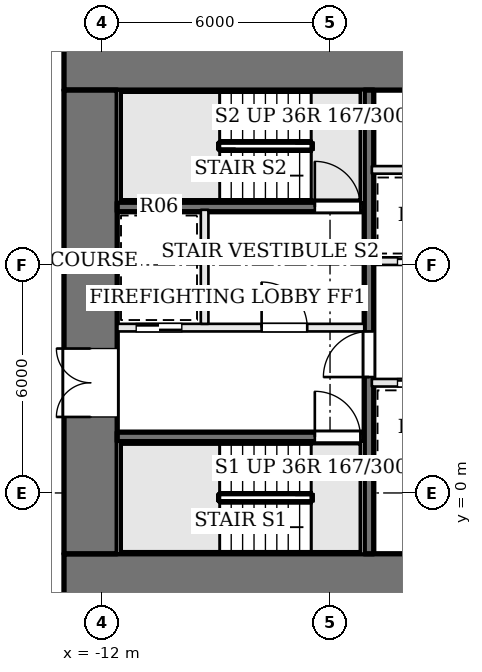
"""IFC4 building model, lengths in metres.
Left out: names, types, materials, properties, quantities, classifications, styles, units other than length and angle.
Written with IfcOpenShell. Run it as: python <this file> out.ifc"""

import sys

from ifc_helpers import new_model, si_unit, direction, frame, frame_2d, origin, place, context, subcontext, project, spatial, rectangle, extrude, element, fill, save


model = new_model("IFC4")
c1 = context("Model", 3, precision=1e-05, world=origin(), true_north=direction((0.0, 1.0)))
c2 = subcontext(c1, "Body", "Model", "MODEL_VIEW")
j1 = project(units=[si_unit("LENGTHUNIT", "METRE"), si_unit("PLANEANGLEUNIT", "RADIAN")], contexts=[c1])
p1 = place(None, origin())
s1 = spatial("IfcSite", under=j1, at=p1, CompositionType="ELEMENT")
p2 = place(p1, origin())
s2 = spatial("IfcBuilding", under=s1, at=p2, CompositionType="ELEMENT")
p3 = place(p2, frame((0.0, 0.0, -6.0)))
s3 = spatial("IfcBuildingStorey", under=s2, at=p3, CompositionType="ELEMENT", Elevation=-6.0)
p4 = place(p3, frame((-13.0, 11.3, 0.0), z_axis=(0.0, 0.0, 1.0), x_axis=(1.0, 0.0, 0.0)))
e1 = element("IfcWall", 1, at=p4, inside=s3, PredefinedType="SHEAR", context=c2, shape_type="SweptSolid", body=[
    extrude(rectangle(XDim=26.0, YDim=1.4, at=frame_2d((13.0, 0.0))), origin(), (0.0, 0.0, 1.0), 6.0),
])
p5 = place(p4, frame((9.375, 0.0, 0.0)))
e2 = element("IfcOpeningElement", 2, at=p5, cuts=e1, PredefinedType="OPENING", context=c2, shape_type="SweptSolid", body=[
    extrude(rectangle(XDim=0.7, YDim=2.1, at=frame_2d((0.35, 1.05))), frame((0.0, 0.71, 0.0), z_axis=(0.0, -1.0, 0.0), x_axis=(1.0, 0.0, 0.0)), (0.0, 0.0, 1.0), 1.42),
])
p6 = place(p4, frame((12.625, 0.0, 0.0)))
e3 = element("IfcOpeningElement", 3, at=p6, cuts=e1, PredefinedType="OPENING", context=c2, shape_type="SweptSolid", body=[
    extrude(rectangle(XDim=0.7, YDim=2.1, at=frame_2d((0.35, 1.05))), frame((0.0, 0.71, 0.0), z_axis=(0.0, -1.0, 0.0), x_axis=(1.0, 0.0, 0.0)), (0.0, 0.0, 1.0), 1.42),
])
p7 = place(p4, frame((14.8, 0.0, 0.0)))
e4 = element("IfcOpeningElement", 4, at=p7, cuts=e1, PredefinedType="OPENING", context=c2, shape_type="SweptSolid", body=[
    extrude(rectangle(XDim=1.0, YDim=2.1, at=frame_2d((0.5, 1.05))), frame((0.0, 0.71, 0.0), z_axis=(0.0, -1.0, 0.0), x_axis=(1.0, 0.0, 0.0)), (0.0, 0.0, 1.0), 1.42),
])
p8 = place(p3, frame((-13.0, -2.3, 0.0), z_axis=(0.0, 0.0, 1.0), x_axis=(1.0, 0.0, 0.0)))
e5 = element("IfcWall", 5, at=p8, inside=s3, PredefinedType="SHEAR", context=c2, shape_type="SweptSolid", body=[
    extrude(rectangle(XDim=26.0, YDim=1.4, at=frame_2d((13.0, 0.0))), origin(), (0.0, 0.0, 1.0), 6.0),
])
p9 = place(p8, frame((9.125, 0.0, 0.0)))
e6 = element("IfcOpeningElement", 6, at=p9, cuts=e5, PredefinedType="OPENING", context=c2, shape_type="SweptSolid", body=[
    extrude(rectangle(XDim=1.2, YDim=2.1, at=frame_2d((0.6, 1.05))), frame((0.0, 0.71, 0.0), z_axis=(0.0, -1.0, 0.0), x_axis=(1.0, 0.0, 0.0)), (0.0, 0.0, 1.0), 1.42),
])
p10 = place(p8, frame((12.625, 0.0, 0.0)))
e7 = element("IfcOpeningElement", 7, at=p10, cuts=e5, PredefinedType="OPENING", context=c2, shape_type="SweptSolid", body=[
    extrude(rectangle(XDim=0.7, YDim=2.1, at=frame_2d((0.35, 1.05))), frame((0.0, 0.71, 0.0), z_axis=(0.0, -1.0, 0.0), x_axis=(1.0, 0.0, 0.0)), (0.0, 0.0, 1.0), 1.42),
])
p11 = place(p8, frame((15.75, 0.0, 0.0)))
e8 = element("IfcOpeningElement", 8, at=p11, cuts=e5, PredefinedType="OPENING", context=c2, shape_type="SweptSolid", body=[
    extrude(rectangle(XDim=1.0, YDim=2.1, at=frame_2d((0.5, 1.05))), frame((0.0, 0.71, 0.0), z_axis=(0.0, -1.0, 0.0), x_axis=(1.0, 0.0, 0.0)), (0.0, 0.0, 1.0), 1.42),
])
p12 = place(p3, frame((-12.3, -1.6, 0.0), z_axis=(0.0, 0.0, 1.0), x_axis=(0.0, 1.0, 0.0)))
e9 = element("IfcWall", 9, at=p12, inside=s3, PredefinedType="SHEAR", context=c2, shape_type="SweptSolid", body=[
    extrude(rectangle(XDim=12.2, YDim=1.4, at=frame_2d((6.1, 0.0))), origin(), (0.0, 0.0, 1.0), 6.0),
])
p13 = place(p12, frame((3.6, 0.0, 0.0)))
e10 = element("IfcOpeningElement", 10, at=p13, cuts=e9, PredefinedType="OPENING", context=c2, shape_type="SweptSolid", body=[
    extrude(rectangle(XDim=1.8, YDim=2.1, at=frame_2d((0.9, 1.05))), frame((0.0, 0.71, 0.0), z_axis=(0.0, -1.0, 0.0), x_axis=(1.0, 0.0, 0.0)), (0.0, 0.0, 1.0), 1.42),
])
p14 = place(p3, frame((-11.6, 1.475, 0.0), z_axis=(0.0, 0.0, 1.0), x_axis=(1.0, 0.0, 0.0)))
e11 = element("IfcWall", 11, at=p14, inside=s3, PredefinedType="SOLIDWALL", context=c2, shape_type="SweptSolid", body=[
    extrude(rectangle(XDim=6.5, YDim=0.25, at=frame_2d((3.25, 0.0))), origin(), (0.0, 0.0, 1.0), 5.65),
])
p15 = place(p14, frame((5.2, 0.0, 0.0)))
e12 = element("IfcOpeningElement", 12, at=p15, cuts=e11, PredefinedType="OPENING", context=c2, shape_type="SweptSolid", body=[
    extrude(rectangle(XDim=1.2, YDim=2.1, at=frame_2d((0.6, 1.05))), frame((0.0, 0.135, 0.0), z_axis=(0.0, -1.0, 0.0), x_axis=(1.0, 0.0, 0.0)), (0.0, 0.0, 1.0), 0.27),
])
p16 = place(p3, frame((-11.6, 4.35, 0.0), z_axis=(0.0, 0.0, 1.0), x_axis=(1.0, 0.0, 0.0)))
e13 = element("IfcWall", 13, at=p16, inside=s3, PredefinedType="SOLIDWALL", context=c2, shape_type="SweptSolid", body=[
    extrude(rectangle(XDim=6.5, YDim=0.2, at=frame_2d((3.25, 0.0))), origin(), (0.0, 0.0, 1.0), 5.65),
])
p17 = place(p16, frame((3.8, 0.0, 0.0)))
e14 = element("IfcOpeningElement", 14, at=p17, cuts=e13, PredefinedType="OPENING", context=c2, shape_type="SweptSolid", body=[
    extrude(rectangle(XDim=1.2, YDim=2.1, at=frame_2d((0.6, 1.05))), frame((0.0, 0.11, 0.0), z_axis=(0.0, -1.0, 0.0), x_axis=(1.0, 0.0, 0.0)), (0.0, 0.0, 1.0), 0.22),
])
p18 = place(p16, frame((0.5, 0.0, 0.0)))
e15 = element("IfcOpeningElement", 15, at=p18, cuts=e13, PredefinedType="OPENING", context=c2, shape_type="SweptSolid", body=[
    extrude(rectangle(XDim=1.2, YDim=2.1, at=frame_2d((0.6, 1.05))), frame((0.0, 0.11, 0.0), z_axis=(0.0, -1.0, 0.0), x_axis=(1.0, 0.0, 0.0)), (0.0, 0.0, 1.0), 0.22),
])
p19 = place(p3, frame((-11.6, 7.525, 0.0), z_axis=(0.0, 0.0, 1.0), x_axis=(1.0, 0.0, 0.0)))
e16 = element("IfcWall", 16, at=p19, inside=s3, PredefinedType="SOLIDWALL", context=c2, shape_type="SweptSolid", body=[
    extrude(rectangle(XDim=6.5, YDim=0.25, at=frame_2d((3.25, 0.0))), origin(), (0.0, 0.0, 1.0), 5.65),
])
p20 = place(p19, frame((5.2, 0.0, 0.0)))
e17 = element("IfcOpeningElement", 17, at=p20, cuts=e16, PredefinedType="OPENING", context=c2, shape_type="SweptSolid", body=[
    extrude(rectangle(XDim=1.2, YDim=2.1, at=frame_2d((0.6, 1.05))), frame((0.0, 0.135, 0.0), z_axis=(0.0, -1.0, 0.0), x_axis=(1.0, 0.0, 0.0)), (0.0, 0.0, 1.0), 0.27),
])
p21 = place(p3, frame((-9.3, 4.45, 0.0), z_axis=(0.0, 0.0, 1.0), x_axis=(0.0, 1.0, 0.0)))
e18 = element("IfcWall", 18, at=p21, inside=s3, PredefinedType="SOLIDWALL", context=c2, shape_type="SweptSolid", body=[
    extrude(rectangle(XDim=3.0, YDim=0.2, at=frame_2d((1.5, 0.0))), origin(), (0.0, 0.0, 1.0), 5.65),
])
p22 = place(p3, frame((-4.975, -1.6, 0.0), z_axis=(0.0, 0.0, 1.0), x_axis=(0.0, 1.0, 0.0)))
e19 = element("IfcWall", 19, at=p22, inside=s3, PredefinedType="SOLIDWALL", context=c2, shape_type="SweptSolid", body=[
    extrude(rectangle(XDim=12.2, YDim=0.25, at=frame_2d((6.1, 0.0))), origin(), (0.0, 0.0, 1.0), 5.65),
])
p23 = place(p22, frame((4.65, 0.0, 0.0)))
e20 = element("IfcOpeningElement", 20, at=p23, cuts=e19, PredefinedType="OPENING", context=c2, shape_type="SweptSolid", body=[
    extrude(rectangle(XDim=1.2, YDim=2.1, at=frame_2d((0.6, 1.05))), frame((0.0, 0.135, 0.0), z_axis=(0.0, -1.0, 0.0), x_axis=(1.0, 0.0, 0.0)), (0.0, 0.0, 1.0), 0.27),
])
p24 = place(p3, frame((-4.9, 0.5, 0.0), z_axis=(0.0, 0.0, 1.0), x_axis=(1.0, 0.0, 0.0)))
e21 = element("IfcWall", 21, at=p24, inside=s3, PredefinedType="SOLIDWALL", context=c2, shape_type="SweptSolid", body=[
    extrude(rectangle(XDim=9.8, YDim=0.2, at=frame_2d((4.9, 0.0))), origin(), (0.0, 0.0, 1.0), 5.65),
])
p25 = place(p3, frame((-4.9, 2.9, 0.0), z_axis=(0.0, 0.0, 1.0), x_axis=(1.0, 0.0, 0.0)))
e22 = element("IfcWall", 22, at=p25, inside=s3, PredefinedType="SOLIDWALL", context=c2, shape_type="SweptSolid", body=[
    extrude(rectangle(XDim=9.8, YDim=0.2, at=frame_2d((4.9, 0.0))), origin(), (0.0, 0.0, 1.0), 5.65),
])
p26 = place(p25, frame((0.675, 0.0, 0.0)))
e23 = element("IfcOpeningElement", 23, at=p26, cuts=e22, PredefinedType="OPENING", context=c2, shape_type="SweptSolid", body=[
    extrude(rectangle(XDim=1.1, YDim=2.1, at=frame_2d((0.55, 1.05))), frame((0.0, 0.11, 0.0), z_axis=(0.0, -1.0, 0.0), x_axis=(1.0, 0.0, 0.0)), (0.0, 0.0, 1.0), 0.22),
])
p27 = place(p25, frame((3.125, 0.0, 0.0)))
e24 = element("IfcOpeningElement", 24, at=p27, cuts=e22, PredefinedType="OPENING", context=c2, shape_type="SweptSolid", body=[
    extrude(rectangle(XDim=1.1, YDim=2.1, at=frame_2d((0.55, 1.05))), frame((0.0, 0.11, 0.0), z_axis=(0.0, -1.0, 0.0), x_axis=(1.0, 0.0, 0.0)), (0.0, 0.0, 1.0), 0.22),
])
p28 = place(p25, frame((5.575, 0.0, 0.0)))
e25 = element("IfcOpeningElement", 25, at=p28, cuts=e22, PredefinedType="OPENING", context=c2, shape_type="SweptSolid", body=[
    extrude(rectangle(XDim=1.1, YDim=2.1, at=frame_2d((0.55, 1.05))), frame((0.0, 0.11, 0.0), z_axis=(0.0, -1.0, 0.0), x_axis=(1.0, 0.0, 0.0)), (0.0, 0.0, 1.0), 0.22),
])
p29 = place(p25, frame((8.025, 0.0, 0.0)))
e26 = element("IfcOpeningElement", 26, at=p29, cuts=e22, PredefinedType="OPENING", context=c2, shape_type="SweptSolid", body=[
    extrude(rectangle(XDim=1.1, YDim=2.1, at=frame_2d((0.55, 1.05))), frame((0.0, 0.11, 0.0), z_axis=(0.0, -1.0, 0.0), x_axis=(1.0, 0.0, 0.0)), (0.0, 0.0, 1.0), 0.22),
])
p30 = place(p3, frame((-4.9, 6.1, 0.0), z_axis=(0.0, 0.0, 1.0), x_axis=(1.0, 0.0, 0.0)))
e27 = element("IfcWall", 27, at=p30, inside=s3, PredefinedType="SOLIDWALL", context=c2, shape_type="SweptSolid", body=[
    extrude(rectangle(XDim=9.8, YDim=0.2, at=frame_2d((4.9, 0.0))), origin(), (0.0, 0.0, 1.0), 5.65),
])
p31 = place(p30, frame((0.675, 0.0, 0.0)))
e28 = element("IfcOpeningElement", 28, at=p31, cuts=e27, PredefinedType="OPENING", context=c2, shape_type="SweptSolid", body=[
    extrude(rectangle(XDim=1.1, YDim=2.1, at=frame_2d((0.55, 1.05))), frame((0.0, 0.11, 0.0), z_axis=(0.0, -1.0, 0.0), x_axis=(1.0, 0.0, 0.0)), (0.0, 0.0, 1.0), 0.22),
])
p32 = place(p30, frame((3.125, 0.0, 0.0)))
e29 = element("IfcOpeningElement", 29, at=p32, cuts=e27, PredefinedType="OPENING", context=c2, shape_type="SweptSolid", body=[
    extrude(rectangle(XDim=1.1, YDim=2.1, at=frame_2d((0.55, 1.05))), frame((0.0, 0.11, 0.0), z_axis=(0.0, -1.0, 0.0), x_axis=(1.0, 0.0, 0.0)), (0.0, 0.0, 1.0), 0.22),
])
p33 = place(p30, frame((5.575, 0.0, 0.0)))
e30 = element("IfcOpeningElement", 30, at=p33, cuts=e27, PredefinedType="OPENING", context=c2, shape_type="SweptSolid", body=[
    extrude(rectangle(XDim=1.1, YDim=2.1, at=frame_2d((0.55, 1.05))), frame((0.0, 0.11, 0.0), z_axis=(0.0, -1.0, 0.0), x_axis=(1.0, 0.0, 0.0)), (0.0, 0.0, 1.0), 0.22),
])
p34 = place(p30, frame((8.025, 0.0, 0.0)))
e31 = element("IfcOpeningElement", 31, at=p34, cuts=e27, PredefinedType="OPENING", context=c2, shape_type="SweptSolid", body=[
    extrude(rectangle(XDim=1.1, YDim=2.1, at=frame_2d((0.55, 1.05))), frame((0.0, 0.11, 0.0), z_axis=(0.0, -1.0, 0.0), x_axis=(1.0, 0.0, 0.0)), (0.0, 0.0, 1.0), 0.22),
])
p35 = place(p3, frame((-4.9, 8.5, 0.0), z_axis=(0.0, 0.0, 1.0), x_axis=(1.0, 0.0, 0.0)))
e32 = element("IfcWall", 32, at=p35, inside=s3, PredefinedType="SOLIDWALL", context=c2, shape_type="SweptSolid", body=[
    extrude(rectangle(XDim=9.8, YDim=0.2, at=frame_2d((4.9, 0.0))), origin(), (0.0, 0.0, 1.0), 5.65),
])
p36 = place(p13, origin())
e33 = element("IfcDoor", 33, at=p36, inside=s3, OperationType="DOUBLE_DOOR_SINGLE_SWING", PredefinedType="DOOR", context=c2, shape_type="SweptSolid", body=[
    extrude(rectangle(XDim=1.8, YDim=2.1, at=frame_2d((0.9, 1.05))), frame((0.0, 0.025, 0.0), z_axis=(0.0, -1.0, 0.0), x_axis=(1.0, 0.0, 0.0)), (0.0, 0.0, 1.0), 0.05),
])
fill(e10, e33)
p37 = place(p23, origin())
e34 = element("IfcDoor", 34, at=p37, inside=s3, OperationType="SINGLE_SWING_LEFT", PredefinedType="DOOR", context=c2, shape_type="SweptSolid", body=[
    extrude(rectangle(XDim=1.2, YDim=2.1, at=frame_2d((0.6, 1.05))), frame((0.0, 0.025, 0.0), z_axis=(0.0, -1.0, 0.0), x_axis=(1.0, 0.0, 0.0)), (0.0, 0.0, 1.0), 0.05),
])
fill(e20, e34)
p38 = place(p17, origin())
e35 = element("IfcDoor", 35, at=p38, inside=s3, OperationType="SINGLE_SWING_LEFT", PredefinedType="DOOR", context=c2, shape_type="SweptSolid", body=[
    extrude(rectangle(XDim=1.2, YDim=2.1, at=frame_2d((0.6, 1.05))), frame((0.0, 0.025, 0.0), z_axis=(0.0, -1.0, 0.0), x_axis=(1.0, 0.0, 0.0)), (0.0, 0.0, 1.0), 0.05),
])
fill(e14, e35)
p39 = place(p15, origin())
e36 = element("IfcDoor", 36, at=p39, inside=s3, OperationType="SINGLE_SWING_LEFT", PredefinedType="DOOR", context=c2, shape_type="SweptSolid", body=[
    extrude(rectangle(XDim=1.2, YDim=2.1, at=frame_2d((0.6, 1.05))), frame((0.0, 0.025, 0.0), z_axis=(0.0, -1.0, 0.0), x_axis=(1.0, 0.0, 0.0)), (0.0, 0.0, 1.0), 0.05),
])
fill(e12, e36)
p40 = place(p20, origin())
e37 = element("IfcDoor", 37, at=p40, inside=s3, OperationType="SINGLE_SWING_LEFT", PredefinedType="DOOR", context=c2, shape_type="SweptSolid", body=[
    extrude(rectangle(XDim=1.2, YDim=2.1, at=frame_2d((0.6, 1.05))), frame((0.0, 0.025, 0.0), z_axis=(0.0, -1.0, 0.0), x_axis=(1.0, 0.0, 0.0)), (0.0, 0.0, 1.0), 0.05),
])
fill(e17, e37)
p41 = place(p18, origin())
e38 = element("IfcDoor", 38, at=p41, inside=s3, OperationType="SLIDING_TO_RIGHT", PredefinedType="DOOR", context=c2, shape_type="SweptSolid", body=[
    extrude(rectangle(XDim=1.2, YDim=2.1, at=frame_2d((0.6, 1.05))), frame((0.0, 0.025, 0.0), z_axis=(0.0, -1.0, 0.0), x_axis=(1.0, 0.0, 0.0)), (0.0, 0.0, 1.0), 0.05),
])
fill(e15, e38)
p42 = place(p26, origin())
e39 = element("IfcDoor", 39, at=p42, inside=s3, OperationType="SLIDING_TO_RIGHT", PredefinedType="DOOR", context=c2, shape_type="SweptSolid", body=[
    extrude(rectangle(XDim=1.1, YDim=2.1, at=frame_2d((0.55, 1.05))), frame((0.0, 0.025, 0.0), z_axis=(0.0, -1.0, 0.0), x_axis=(1.0, 0.0, 0.0)), (0.0, 0.0, 1.0), 0.05),
])
fill(e23, e39)
p43 = place(p31, origin())
e40 = element("IfcDoor", 40, at=p43, inside=s3, OperationType="SLIDING_TO_RIGHT", PredefinedType="DOOR", context=c2, shape_type="SweptSolid", body=[
    extrude(rectangle(XDim=1.1, YDim=2.1, at=frame_2d((0.55, 1.05))), frame((0.0, 0.025, 0.0), z_axis=(0.0, -1.0, 0.0), x_axis=(1.0, 0.0, 0.0)), (0.0, 0.0, 1.0), 0.05),
])
fill(e28, e40)
save(model, sys.argv[1])
